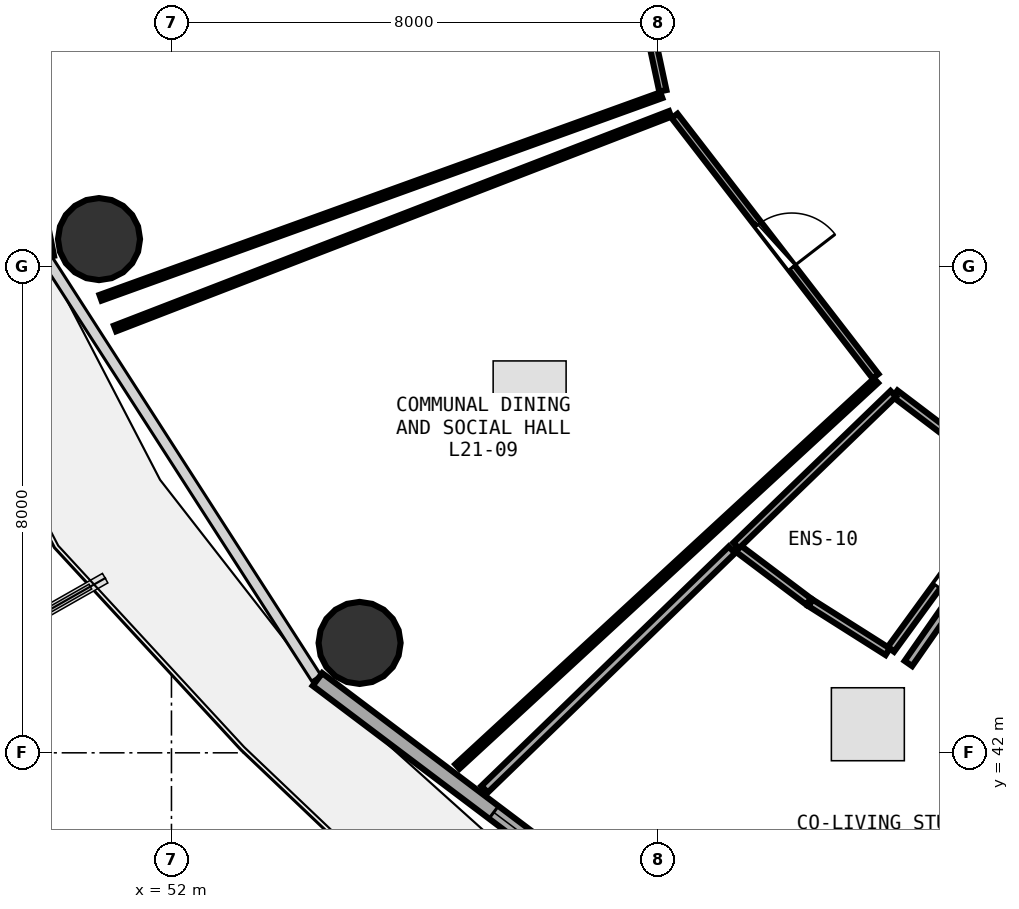
"""IFC4 building model, lengths in metres.
Left out: names, types, materials, properties, quantities, classifications, styles, units other than length and angle.
Written with IfcOpenShell. Run it as: python <this file> out.ifc"""

import sys

from ifc_helpers import new_model, si_unit, direction, frame, frame_2d, origin, origin_2d, place, context, subcontext, project, spatial, rectangle, circle, extrude, element, fill, save


model = new_model("IFC4")
c1 = context("Model", 3, precision=1e-05, world=origin(), true_north=direction((0.0, 1.0)))
c2 = subcontext(c1, "Body", "Model", "MODEL_VIEW")
j1 = project(units=[si_unit("LENGTHUNIT", "METRE"), si_unit("PLANEANGLEUNIT", "RADIAN")], contexts=[c1])
p1 = place(None, origin())
s1 = spatial("IfcSite", under=j1, at=p1, CompositionType="ELEMENT")
p2 = place(p1, origin())
s2 = spatial("IfcBuilding", under=s1, at=p2, CompositionType="ELEMENT")
p3 = place(p2, frame((0.0, 0.0, 83.85)))
s3 = spatial("IfcBuildingStorey", under=s2, at=p3, CompositionType="ELEMENT", Elevation=83.85)
for number, where, z_axis, x_axis in (
    (1, (50.808, 50.448, 0.0), (0.0, 0.0, 1.0), (1.0, 0.0, 0.0)),
    (2, (55.094, 43.807, 0.0), (0.0, 0.0, 1.0), (1.0, 0.0, 0.0)),
):
    element("IfcColumn", number, at=place(p3, frame(where, z_axis=z_axis, x_axis=x_axis)), inside=s3, PredefinedType="COLUMN", context=c2, shape_type="SweptSolid", body=[
        extrude(circle(Radius=0.675, at=origin_2d()), origin(), (0.0, 0.0, 1.0), 3.75),
    ])
p4 = place(p3, frame((48.403, 57.985, 0.0), z_axis=(0.0, 0.0, 1.0), x_axis=(0.192581843632, -0.981280914674, 0.0)))
e3 = element("IfcWall", 3, at=p4, inside=s3, PredefinedType="SOLIDWALL", context=c2, shape_type="SweptSolid", body=[
    extrude(rectangle(XDim=7.987, YDim=0.26, at=frame_2d((3.993, 0.0))), origin(), (0.0, 0.0, 1.0), 3.475),
])
p5 = place(p4, frame((3.193, 0.0, 0.85)))
e4 = element("IfcOpeningElement", 4, at=p5, cuts=e3, PredefinedType="OPENING", context=c2, shape_type="SweptSolid", body=[
    extrude(rectangle(XDim=1.6, YDim=1.45, at=frame_2d((0.8, 0.725))), frame((0.0, 0.14, 0.0), z_axis=(0.0, -1.0, 0.0), x_axis=(1.0, 0.0, 0.0)), (0.0, 0.0, 1.0), 0.28),
])
p6 = place(p3, frame((54.401, 43.207, 0.0), z_axis=(0.0, 0.0, 1.0), x_axis=(0.798501507879, -0.601992808857, 0.0)))
e5 = element("IfcWall", 5, at=p6, inside=s3, PredefinedType="SOLIDWALL", context=c2, shape_type="SweptSolid", body=[
    extrude(rectangle(XDim=8.499, YDim=0.26, at=frame_2d((4.25, 0.0))), origin(), (0.0, 0.0, 1.0), 3.475),
])
p7 = place(p6, frame((3.63, 0.0, 0.85)))
e6 = element("IfcOpeningElement", 6, at=p7, cuts=e5, PredefinedType="OPENING", context=c2, shape_type="SweptSolid", body=[
    extrude(rectangle(XDim=1.6, YDim=1.45, at=frame_2d((0.8, 0.725))), frame((0.0, 0.14, 0.0), z_axis=(0.0, -1.0, 0.0), x_axis=(1.0, 0.0, 0.0)), (0.0, 0.0, 1.0), 0.28),
])
p8 = place(p3, frame((58.983, 58.012, 0.0), z_axis=(0.0, 0.0, 1.0), x_axis=(0.209586341226, -0.977790143933, 0.0)))
e7 = element("IfcWall", 7, at=p8, inside=s3, PredefinedType="PARTITIONING", context=c2, shape_type="SweptSolid", body=[
    extrude(rectangle(XDim=5.242, YDim=0.12, at=frame_2d((2.621, 0.0))), origin(), (0.0, 0.0, 1.0), 2.925),
])
p9 = place(p8, frame((2.171, 0.0, 0.0)))
e8 = element("IfcOpeningElement", 8, at=p9, cuts=e7, PredefinedType="OPENING", context=c2, shape_type="SweptSolid", body=[
    extrude(rectangle(XDim=0.9, YDim=2.08, at=frame_2d((0.45, 1.04))), frame((0.0, 0.07, 0.0), z_axis=(0.0, -1.0, 0.0), x_axis=(1.0, 0.0, 0.0)), (0.0, 0.0, 1.0), 0.14),
])
p10 = place(p3, frame((60.275, 52.473, 0.0), z_axis=(0.0, 0.0, 1.0), x_axis=(0.611167326409, -0.791501420801, 0.0)))
e9 = element("IfcWall", 9, at=p10, inside=s3, PredefinedType="PARTITIONING", context=c2, shape_type="SweptSolid", body=[
    extrude(rectangle(XDim=5.407, YDim=0.12, at=frame_2d((2.704, 0.0))), origin(), (0.0, 0.0, 1.0), 2.925),
])
p11 = place(p10, frame((2.254, 0.0, 0.0)))
e10 = element("IfcOpeningElement", 10, at=p11, cuts=e9, PredefinedType="OPENING", context=c2, shape_type="SweptSolid", body=[
    extrude(rectangle(XDim=0.9, YDim=2.08, at=frame_2d((0.45, 1.04))), frame((0.0, 0.07, 0.0), z_axis=(0.0, -1.0, 0.0), x_axis=(1.0, 0.0, 0.0)), (0.0, 0.0, 1.0), 0.14),
])
p12 = place(p3, frame((65.855, 46.477, 0.0), z_axis=(0.0, 0.0, 1.0), x_axis=(-0.589016516568, -0.808120995402, 0.0)))
e11 = element("IfcWall", 11, at=p12, inside=s3, PredefinedType="PLUMBINGWALL", context=c2, shape_type="SweptSolid", body=[
    extrude(rectangle(XDim=3.435, YDim=0.13, at=frame_2d((1.718, 0.0))), origin(), (0.0, 0.0, 1.0), 3.175),
])
p13 = place(p12, frame((1.288, 0.0, 0.0)))
e12 = element("IfcOpeningElement", 12, at=p13, cuts=e11, PredefinedType="OPENING", context=c2, shape_type="SweptSolid", body=[
    extrude(rectangle(XDim=0.86, YDim=2.05, at=frame_2d((0.43, 1.025))), frame((0.0, 0.075, 0.0), z_axis=(0.0, -1.0, 0.0), x_axis=(1.0, 0.0, 0.0)), (0.0, 0.0, 1.0), 0.15),
])
p14 = place(p3, frame((60.056, 52.814, 0.0), z_axis=(0.0, 0.0, 1.0), x_axis=(-0.940543515483, -0.339673218671, 0.0)))
e13 = element("IfcWall", 13, at=p14, inside=s3, PredefinedType="PARTITIONING", context=c2, shape_type="SweptSolid", body=[
    extrude(rectangle(XDim=9.806, YDim=0.1, at=frame_2d((4.903, 0.0))), origin(), (0.0, 0.0, 1.0), 2.925),
])
p15 = place(p3, frame((63.587, 48.119, 0.0), z_axis=(0.0, 0.0, 1.0), x_axis=(-0.735387084409, -0.677647279995, 0.0)))
e14 = element("IfcWall", 14, at=p15, inside=s3, PredefinedType="PARTITIONING", context=c2, shape_type="SweptSolid", body=[
    extrude(rectangle(XDim=9.361, YDim=0.1, at=frame_2d((4.681, 0.0))), origin(), (0.0, 0.0, 1.0), 2.975),
])
p16 = place(p3, frame((51.072, 48.979, 0.0), z_axis=(0.0, 0.0, 1.0), x_axis=(0.932757339165, 0.360504849112, 0.0)))
e15 = element("IfcWall", 15, at=p16, inside=s3, PredefinedType="PARTITIONING", context=c2, shape_type="SweptSolid", body=[
    extrude(rectangle(XDim=9.786, YDim=0.1, at=frame_2d((4.893, 0.0))), origin(), (0.0, 0.0, 1.0), 2.925),
])
p17 = place(p3, frame((63.901, 47.907, 0.0), z_axis=(0.0, 0.0, 1.0), x_axis=(0.796629313308, -0.604468144056, 0.0)))
e16 = element("IfcWall", 16, at=p17, inside=s3, PredefinedType="PLUMBINGWALL", context=c2, shape_type="SweptSolid", body=[
    extrude(rectangle(XDim=1.178, YDim=0.13, at=frame_2d((0.589, 0.0))), origin(), (0.0, 0.0, 1.0), 2.925),
])
p18 = place(p3, frame((63.779, 43.663, 0.0), z_axis=(0.0, 0.0, 1.0), x_axis=(-0.844931806669, 0.53487404319, 0.0)))
e17 = element("IfcWall", 17, at=p18, inside=s3, PredefinedType="PLUMBINGWALL", context=c2, shape_type="SweptSolid", body=[
    extrude(rectangle(XDim=1.501, YDim=0.13, at=frame_2d((0.75, 0.0))), origin(), (0.0, 0.0, 1.0), 2.925),
])
p19 = place(p3, frame((62.478, 44.488, 0.0), z_axis=(0.0, 0.0, 1.0), x_axis=(-0.798935684124, 0.601416471868, 0.0)))
e18 = element("IfcWall", 18, at=p19, inside=s3, PredefinedType="PLUMBINGWALL", context=c2, shape_type="SweptSolid", body=[
    extrude(rectangle(XDim=1.488, YDim=0.13, at=frame_2d((0.744, 0.0))), origin(), (0.0, 0.0, 1.0), 3.175),
])
p20 = place(p3, frame((61.287, 45.409, 0.0), z_axis=(0.0, 0.0, 1.0), x_axis=(0.719134400332, 0.694871005481, 0.0)))
e19 = element("IfcWall", 19, at=p20, inside=s3, PredefinedType="PLUMBINGWALL", context=c2, shape_type="SweptSolid", body=[
    extrude(rectangle(XDim=3.592, YDim=0.13, at=frame_2d((1.796, 0.0))), origin(), (0.0, 0.0, 1.0), 3.175),
])
p21 = place(p3, frame((57.15, 41.401, 0.0), z_axis=(0.0, 0.0, 1.0), x_axis=(0.718527749954, 0.695498290829, 0.0)))
e20 = element("IfcWall", 20, at=p21, inside=s3, PredefinedType="PARTITIONING", context=c2, shape_type="SweptSolid", body=[
    extrude(rectangle(XDim=5.661, YDim=0.15, at=frame_2d((2.831, 0.0))), origin(), (0.0, 0.0, 1.0), 2.975),
])
p22 = place(p3, frame((64.12, 43.469, 0.0), z_axis=(0.0, 0.0, 1.0), x_axis=(0.571339432424, 0.820713867897, 0.0)))
e21 = element("IfcWall", 21, at=p22, inside=s3, PredefinedType="PARTITIONING", context=c2, shape_type="SweptSolid", body=[
    extrude(rectangle(XDim=1.275, YDim=0.15, at=frame_2d((0.637, 0.0))), origin(), (0.0, 0.0, 1.0), 3.175),
])
p23 = place(p7, origin())
e22 = element("IfcWindow", 22, at=p23, inside=s3, PartitioningType="SINGLE_PANEL", PredefinedType="WINDOW", context=c2, shape_type="SweptSolid", body=[
    extrude(rectangle(XDim=1.6, YDim=1.45, at=frame_2d((0.8, 0.725))), frame((0.0, 0.03, 0.0), z_axis=(0.0, -1.0, 0.0), x_axis=(1.0, 0.0, 0.0)), (0.0, 0.0, 1.0), 0.06),
])
fill(e6, e22)
p24 = place(p11, origin())
e23 = element("IfcDoor", 23, at=p24, inside=s3, OperationType="SINGLE_SWING_RIGHT", PredefinedType="DOOR", context=c2, shape_type="SweptSolid", body=[
    extrude(rectangle(XDim=0.9, YDim=2.08, at=frame_2d((0.45, 1.04))), frame((0.0, 0.025, 0.0), z_axis=(0.0, -1.0, 0.0), x_axis=(1.0, 0.0, 0.0)), (0.0, 0.0, 1.0), 0.05),
])
fill(e10, e23)
p25 = place(p13, origin())
e24 = element("IfcDoor", 24, at=p25, inside=s3, OperationType="SINGLE_SWING_LEFT", PredefinedType="DOOR", context=c2, shape_type="SweptSolid", body=[
    extrude(rectangle(XDim=0.86, YDim=2.05, at=frame_2d((0.43, 1.025))), frame((0.0, 0.025, 0.0), z_axis=(0.0, -1.0, 0.0), x_axis=(1.0, 0.0, 0.0)), (0.0, 0.0, 1.0), 0.05),
])
fill(e12, e24)
save(model, sys.argv[1])
